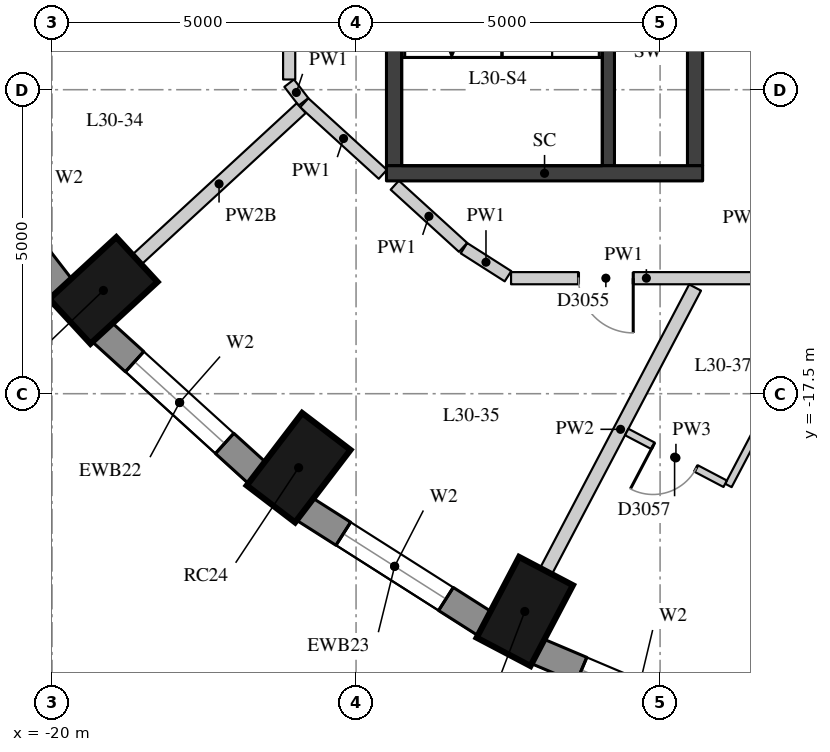
"""IFC4 building model, lengths in metres.
Left out: names, types, materials, properties, quantities, classifications, styles, units other than length and angle.
Written with IfcOpenShell. Run it as: python <this file> out.ifc"""

import sys

from ifc_helpers import new_model, si_unit, direction, frame, frame_2d, origin, origin_2d, place, context, subcontext, project, spatial, rectangle, extrude, element, fill, save


model = new_model("IFC4")
c1 = context("Model", 3, precision=1e-05, world=origin(), true_north=direction((0.0, 1.0)))
c2 = subcontext(c1, "Body", "Model", "MODEL_VIEW")
j1 = project(units=[si_unit("LENGTHUNIT", "METRE"), si_unit("PLANEANGLEUNIT", "RADIAN")], contexts=[c1])
p1 = place(None, origin())
s1 = spatial("IfcSite", under=j1, at=p1, CompositionType="ELEMENT")
p2 = place(p1, origin())
s2 = spatial("IfcBuilding", under=s1, at=p2, CompositionType="ELEMENT")
p3 = place(p2, frame((0.0, 0.0, 108.7)))
s3 = spatial("IfcBuildingStorey", under=s2, at=p3, CompositionType="ELEMENT", Elevation=108.7)
for number, where, z_axis, x_axis in (
    (1, (-19.156, -15.802, 0.0), (0.0, 0.0, 1.0), (-0.735, -0.678, 0.0)),
    (2, (-15.945, -18.717, 0.0), (0.0, 0.0, 1.0), (-0.607, -0.795, 0.0)),
    (3, (-12.225, -21.082, 0.0), (0.0, 0.0, 1.0), (-0.465, -0.885, 0.0)),
    (4, (-8.11, -22.824, 0.0), (0.0, 0.0, 1.0), (-0.315, -0.949, 0.0)),
):
    element("IfcColumn", number, at=place(p3, frame(where, z_axis=z_axis, x_axis=x_axis)), inside=s3, PredefinedType="COLUMN", context=c2, shape_type="SweptSolid", body=[
        extrude(rectangle(XDim=1.5, YDim=1.0, at=origin_2d()), origin(), (0.0, 0.0, 1.0), 3.3),
    ])
p4 = place(p3, frame((-21.908, -13.087, 0.0), z_axis=(0.0, 0.0, 1.0), x_axis=(0.610693945156, -0.791866721961, 0.0)))
e5 = element("IfcWall", 5, at=p4, inside=s3, PredefinedType="SOLIDWALL", context=c2, shape_type="SweptSolid", body=[
    extrude(rectangle(XDim=3.395, YDim=0.45, at=frame_2d((1.697, 0.0))), origin(), (0.0, 0.0, 1.0), 3.02),
])
p5 = place(p4, frame((0.697, 0.0, 0.4)))
e6 = element("IfcOpeningElement", 6, at=p5, cuts=e5, PredefinedType="OPENING", context=c2, shape_type="SweptSolid", body=[
    extrude(rectangle(XDim=2.0, YDim=1.75, at=frame_2d((1.0, 0.875))), frame((0.0, 0.235, 0.0), z_axis=(0.0, -1.0, 0.0), x_axis=(1.0, 0.0, 0.0)), (0.0, 0.0, 1.0), 0.47),
])
p6 = place(p3, frame((-19.184, -16.481, 0.0), z_axis=(0.0, 0.0, 1.0), x_axis=(0.740364106106, -0.672206062446, 0.0)))
e7 = element("IfcWall", 7, at=p6, inside=s3, PredefinedType="SOLIDWALL", context=c2, shape_type="SweptSolid", body=[
    extrude(rectangle(XDim=3.464, YDim=0.45, at=frame_2d((1.732, 0.0))), origin(), (0.0, 0.0, 1.0), 3.02),
])
p7 = place(p6, frame((0.732, 0.0, 0.4)))
e8 = element("IfcOpeningElement", 8, at=p7, cuts=e7, PredefinedType="OPENING", context=c2, shape_type="SweptSolid", body=[
    extrude(rectangle(XDim=2.0, YDim=1.75, at=frame_2d((1.0, 0.875))), frame((0.0, 0.235, 0.0), z_axis=(0.0, -1.0, 0.0), x_axis=(1.0, 0.0, 0.0)), (0.0, 0.0, 1.0), 0.47),
])
p8 = place(p3, frame((-15.856, -19.392, 0.0), z_axis=(0.0, 0.0, 1.0), x_axis=(0.843891947083, -0.53651317006, 0.0)))
e9 = element("IfcWall", 9, at=p8, inside=s3, PredefinedType="SOLIDWALL", context=c2, shape_type="SweptSolid", body=[
    extrude(rectangle(XDim=3.532, YDim=0.45, at=frame_2d((1.766, 0.0))), origin(), (0.0, 0.0, 1.0), 3.02),
])
p9 = place(p8, frame((0.766, 0.0, 0.4)))
e10 = element("IfcOpeningElement", 10, at=p9, cuts=e9, PredefinedType="OPENING", context=c2, shape_type="SweptSolid", body=[
    extrude(rectangle(XDim=2.0, YDim=1.75, at=frame_2d((1.0, 0.875))), frame((0.0, 0.235, 0.0), z_axis=(0.0, -1.0, 0.0), x_axis=(1.0, 0.0, 0.0)), (0.0, 0.0, 1.0), 0.47),
])
p10 = place(p3, frame((-12.025, -21.733, 0.0), z_axis=(0.0, 0.0, 1.0), x_axis=(0.920879975612, -0.389846213932, 0.0)))
e11 = element("IfcWall", 11, at=p10, inside=s3, PredefinedType="SOLIDWALL", context=c2, shape_type="SweptSolid", body=[
    extrude(rectangle(XDim=3.592, YDim=0.45, at=frame_2d((1.796, 0.0))), origin(), (0.0, 0.0, 1.0), 3.02),
])
p11 = place(p10, frame((0.796, 0.0, 0.4)))
e12 = element("IfcOpeningElement", 12, at=p11, cuts=e11, PredefinedType="OPENING", context=c2, shape_type="SweptSolid", body=[
    extrude(rectangle(XDim=2.0, YDim=1.75, at=frame_2d((1.0, 0.875))), frame((0.0, 0.235, 0.0), z_axis=(0.0, -1.0, 0.0), x_axis=(1.0, 0.0, 0.0)), (0.0, 0.0, 1.0), 0.47),
])
p12 = place(p3, frame((-10.85, -13.75, 0.0), z_axis=(0.0, 0.0, 1.0), x_axis=(0.0, 1.0, 0.0)))
e13 = element("IfcWall", 13, at=p12, inside=s3, PredefinedType="SHEAR", context=c2, shape_type="SweptSolid", body=[
    extrude(rectangle(XDim=6.0, YDim=0.2, at=frame_2d((3.0, 0.0))), origin(), (0.0, 0.0, 1.0), 3.02),
])
p13 = place(p12, frame((4.4, 0.0, 0.0)))
e14 = element("IfcOpeningElement", 14, at=p13, cuts=e13, PredefinedType="OPENING", context=c2, shape_type="SweptSolid", body=[
    extrude(rectangle(XDim=1.5, YDim=2.1, at=frame_2d((0.75, 1.05))), frame((0.0, 0.11, 0.0), z_axis=(0.0, -1.0, 0.0), x_axis=(1.0, 0.0, 0.0)), (0.0, 0.0, 1.0), 0.22),
])
p14 = place(p3, frame((-14.375, -13.75, -0.28), z_axis=(0.0, 0.0, 1.0), x_axis=(0.0, 1.0, 0.0)))
e15 = element("IfcWall", 15, at=p14, inside=s3, PredefinedType="SHEAR", context=c2, shape_type="SweptSolid", body=[
    extrude(rectangle(XDim=6.0, YDim=0.25, at=frame_2d((3.0, 0.0))), origin(), (0.0, 0.0, 1.0), 3.3),
])
p15 = place(p3, frame((-9.425, -13.75, -0.28), z_axis=(0.0, 0.0, 1.0), x_axis=(0.0, 1.0, 0.0)))
e16 = element("IfcWall", 16, at=p15, inside=s3, PredefinedType="SHEAR", context=c2, shape_type="SweptSolid", body=[
    extrude(rectangle(XDim=6.0, YDim=0.25, at=frame_2d((3.0, 0.0))), origin(), (0.0, 0.0, 1.0), 3.3),
])
p16 = place(p15, frame((2.4, 0.0, 0.28)))
e17 = element("IfcOpeningElement", 17, at=p16, cuts=e16, PredefinedType="OPENING", context=c2, shape_type="SweptSolid", body=[
    extrude(rectangle(XDim=1.5, YDim=2.1, at=frame_2d((0.75, 1.05))), frame((0.0, 0.135, 0.0), z_axis=(0.0, -1.0, 0.0), x_axis=(1.0, 0.0, 0.0)), (0.0, 0.0, 1.0), 0.27),
])
p17 = place(p3, frame((-14.5, -13.875, -0.28), z_axis=(0.0, 0.0, 1.0), x_axis=(1.0, 0.0, 0.0)))
e18 = element("IfcWall", 18, at=p17, inside=s3, PredefinedType="SHEAR", context=c2, shape_type="SweptSolid", body=[
    extrude(rectangle(XDim=5.2, YDim=0.25, at=frame_2d((2.6, 0.0))), origin(), (0.0, 0.0, 1.0), 3.3),
])
p18 = place(p3, frame((-14.56, -13.891, 0.0), z_axis=(0.0, 0.0, 1.0), x_axis=(-0.739440483737, 0.673221932954, 0.0)))
e19 = element("IfcWall", 19, at=p18, inside=s3, PredefinedType="PARTITIONING", context=c2, shape_type="SweptSolid", body=[
    extrude(rectangle(XDim=1.748, YDim=0.2, at=frame_2d((0.874, 0.0))), origin(), (0.0, 0.0, 1.0), 3.02),
])
p19 = place(p3, frame((-15.864, -12.699, 0.0), z_axis=(0.0, 0.0, 1.0), x_axis=(-0.61004607296, 0.792365943782, 0.0)))
e20 = element("IfcWall", 20, at=p19, inside=s3, PredefinedType="PARTITIONING", context=c2, shape_type="SweptSolid", body=[
    extrude(rectangle(XDim=0.387, YDim=0.2, at=frame_2d((0.193, 0.0))), origin(), (0.0, 0.0, 1.0), 3.02),
])
p20 = place(p3, frame((-16.1, -12.332, 0.0), z_axis=(0.0, 0.0, 1.0), x_axis=(0.0, 1.0, 0.0)))
e21 = element("IfcWall", 21, at=p20, inside=s3, PredefinedType="PARTITIONING", context=c2, shape_type="SweptSolid", body=[
    extrude(rectangle(XDim=6.432, YDim=0.2, at=frame_2d((3.216, 0.0))), origin(), (0.0, 0.0, 1.0), 3.02),
])
p21 = place(p20, frame((1.304, 0.0, 0.0)))
e22 = element("IfcOpeningElement", 22, at=p21, cuts=e21, PredefinedType="OPENING", context=c2, shape_type="SweptSolid", body=[
    extrude(rectangle(XDim=0.9, YDim=2.1, at=frame_2d((0.45, 1.05))), frame((0.0, 0.11, 0.0), z_axis=(0.0, -1.0, 0.0), x_axis=(1.0, 0.0, 0.0)), (0.0, 0.0, 1.0), 0.22),
])
p22 = place(p3, frame((-8.0, -15.6, 0.0), z_axis=(0.0, 0.0, 1.0), x_axis=(-1.0, 0.0, 0.0)))
e23 = element("IfcWall", 23, at=p22, inside=s3, PredefinedType="PARTITIONING", context=c2, shape_type="SweptSolid", body=[
    extrude(rectangle(XDim=4.451, YDim=0.2, at=frame_2d((2.226, 0.0))), origin(), (0.0, 0.0, 1.0), 3.02),
])
p23 = place(p22, frame((2.442, 0.0, 0.0)))
e24 = element("IfcOpeningElement", 24, at=p23, cuts=e23, PredefinedType="OPENING", context=c2, shape_type="SweptSolid", body=[
    extrude(rectangle(XDim=0.9, YDim=2.1, at=frame_2d((0.45, 1.05))), frame((0.0, 0.11, 0.0), z_axis=(0.0, -1.0, 0.0), x_axis=(1.0, 0.0, 0.0)), (0.0, 0.0, 1.0), 0.22),
])
p24 = place(p3, frame((-12.501, -15.568, 0.0), z_axis=(0.0, 0.0, 1.0), x_axis=(-0.843169167706, 0.537648355926, 0.0)))
e25 = element("IfcWall", 25, at=p24, inside=s3, PredefinedType="PARTITIONING", context=c2, shape_type="SweptSolid", body=[
    extrude(rectangle(XDim=0.858, YDim=0.2, at=frame_2d((0.429, 0.0))), origin(), (0.0, 0.0, 1.0), 3.02),
])
p25 = place(p3, frame((-13.24, -15.093, 0.0), z_axis=(0.0, 0.0, 1.0), x_axis=(-0.739438095557, 0.673224556028, 0.0)))
e26 = element("IfcWall", 26, at=p25, inside=s3, PredefinedType="PARTITIONING", context=c2, shape_type="SweptSolid", body=[
    extrude(rectangle(XDim=1.519, YDim=0.2, at=frame_2d((0.76, 0.0))), origin(), (0.0, 0.0, 1.0), 3.02),
])
p26 = place(p3, frame((-21.126, -12.023, 0.0), z_axis=(0.0, 0.0, 1.0), x_axis=(0.844499715613, 0.535556001114, 0.0)))
e27 = element("IfcWall", 27, at=p26, inside=s3, PredefinedType="PARTITIONING", context=c2, shape_type="SweptSolid", body=[
    extrude(rectangle(XDim=5.773, YDim=0.22, at=frame_2d((2.887, 0.0))), origin(), (0.0, 0.0, 1.0), 3.02),
])
p27 = place(p3, frame((-18.604, -15.294, 0.0), z_axis=(0.0, 0.0, 1.0), x_axis=(0.73529495628, 0.677747244383, 0.0)))
e28 = element("IfcWall", 28, at=p27, inside=s3, PredefinedType="PARTITIONING", context=c2, shape_type="SweptSolid", body=[
    extrude(rectangle(XDim=3.674, YDim=0.22, at=frame_2d((1.837, 0.0))), origin(), (0.0, 0.0, 1.0), 2.57),
])
p28 = place(p3, frame((-11.876, -20.418, 0.0), z_axis=(0.0, 0.0, 1.0), x_axis=(0.465320539057, 0.885142246157, 0.0)))
e29 = element("IfcWall", 29, at=p28, inside=s3, PredefinedType="PARTITIONING", context=c2, shape_type="SweptSolid", body=[
    extrude(rectangle(XDim=5.269, YDim=0.22, at=frame_2d((2.635, 0.0))), origin(), (0.0, 0.0, 1.0), 3.02),
])
p29 = place(p3, frame((-6.25, -14.013, 0.0), z_axis=(0.0, 0.0, 1.0), x_axis=(-0.465288210927, -0.885159240347, 0.0)))
e30 = element("IfcWall", 30, at=p29, inside=s3, PredefinedType="PARTITIONING", context=c2, shape_type="SweptSolid", body=[
    extrude(rectangle(XDim=5.644, YDim=0.12, at=frame_2d((2.822, 0.0))), origin(), (0.0, 0.0, 1.0), 3.02),
])
p30 = place(p3, frame((-8.929, -18.981, 0.0), z_axis=(0.0, 0.0, 1.0), x_axis=(-0.885114946598, 0.465372465139, 0.0)))
e31 = element("IfcWall", 31, at=p30, inside=s3, PredefinedType="PARTITIONING", context=c2, shape_type="SweptSolid", body=[
    extrude(rectangle(XDim=1.83, YDim=0.12, at=frame_2d((0.915, 0.0))), origin(), (0.0, 0.0, 1.0), 3.02),
])
p31 = place(p30, frame((0.54, 0.0, 0.0)))
e32 = element("IfcOpeningElement", 32, at=p31, cuts=e31, PredefinedType="OPENING", context=c2, shape_type="SweptSolid", body=[
    extrude(rectangle(XDim=0.8, YDim=2.1, at=frame_2d((0.4, 1.05))), frame((0.0, 0.07, 0.0), z_axis=(0.0, -1.0, 0.0), x_axis=(1.0, 0.0, 0.0)), (0.0, 0.0, 1.0), 0.14),
])
p32 = place(p7, origin())
e33 = element("IfcWindow", 33, at=p32, inside=s3, PartitioningType="SINGLE_PANEL", PredefinedType="WINDOW", context=c2, shape_type="SweptSolid", body=[
    extrude(rectangle(XDim=2.0, YDim=1.75, at=frame_2d((1.0, 0.875))), frame((0.0, 0.035, 0.0), z_axis=(0.0, -1.0, 0.0), x_axis=(1.0, 0.0, 0.0)), (0.0, 0.0, 1.0), 0.06),
])
fill(e8, e33)
p33 = place(p9, origin())
e34 = element("IfcWindow", 34, at=p33, inside=s3, PartitioningType="SINGLE_PANEL", PredefinedType="WINDOW", context=c2, shape_type="SweptSolid", body=[
    extrude(rectangle(XDim=2.0, YDim=1.75, at=frame_2d((1.0, 0.875))), frame((0.0, 0.035, 0.0), z_axis=(0.0, -1.0, 0.0), x_axis=(1.0, 0.0, 0.0)), (0.0, 0.0, 1.0), 0.06),
])
fill(e10, e34)
p34 = place(p11, origin())
e35 = element("IfcWindow", 35, at=p34, inside=s3, PartitioningType="SINGLE_PANEL", PredefinedType="WINDOW", context=c2, shape_type="SweptSolid", body=[
    extrude(rectangle(XDim=2.0, YDim=1.75, at=frame_2d((1.0, 0.875))), frame((0.0, 0.035, 0.0), z_axis=(0.0, -1.0, 0.0), x_axis=(1.0, 0.0, 0.0)), (0.0, 0.0, 1.0), 0.06),
])
fill(e12, e35)
p35 = place(p23, origin())
e36 = element("IfcDoor", 36, at=p35, inside=s3, OperationType="SINGLE_SWING_LEFT", PredefinedType="DOOR", context=c2, shape_type="SweptSolid", body=[
    extrude(rectangle(XDim=0.9, YDim=2.1, at=frame_2d((0.45, 1.05))), frame((0.0, 0.025, 0.0), z_axis=(0.0, -1.0, 0.0), x_axis=(1.0, 0.0, 0.0)), (0.0, 0.0, 1.0), 0.05),
])
fill(e24, e36)
p36 = place(p31, origin())
e37 = element("IfcDoor", 37, at=p36, inside=s3, OperationType="SINGLE_SWING_RIGHT", PredefinedType="DOOR", context=c2, shape_type="SweptSolid", body=[
    extrude(rectangle(XDim=0.8, YDim=2.1, at=frame_2d((0.4, 1.05))), frame((0.0, 0.025, 0.0), z_axis=(0.0, -1.0, 0.0), x_axis=(1.0, 0.0, 0.0)), (0.0, 0.0, 1.0), 0.05),
])
fill(e32, e37)
save(model, sys.argv[1])
